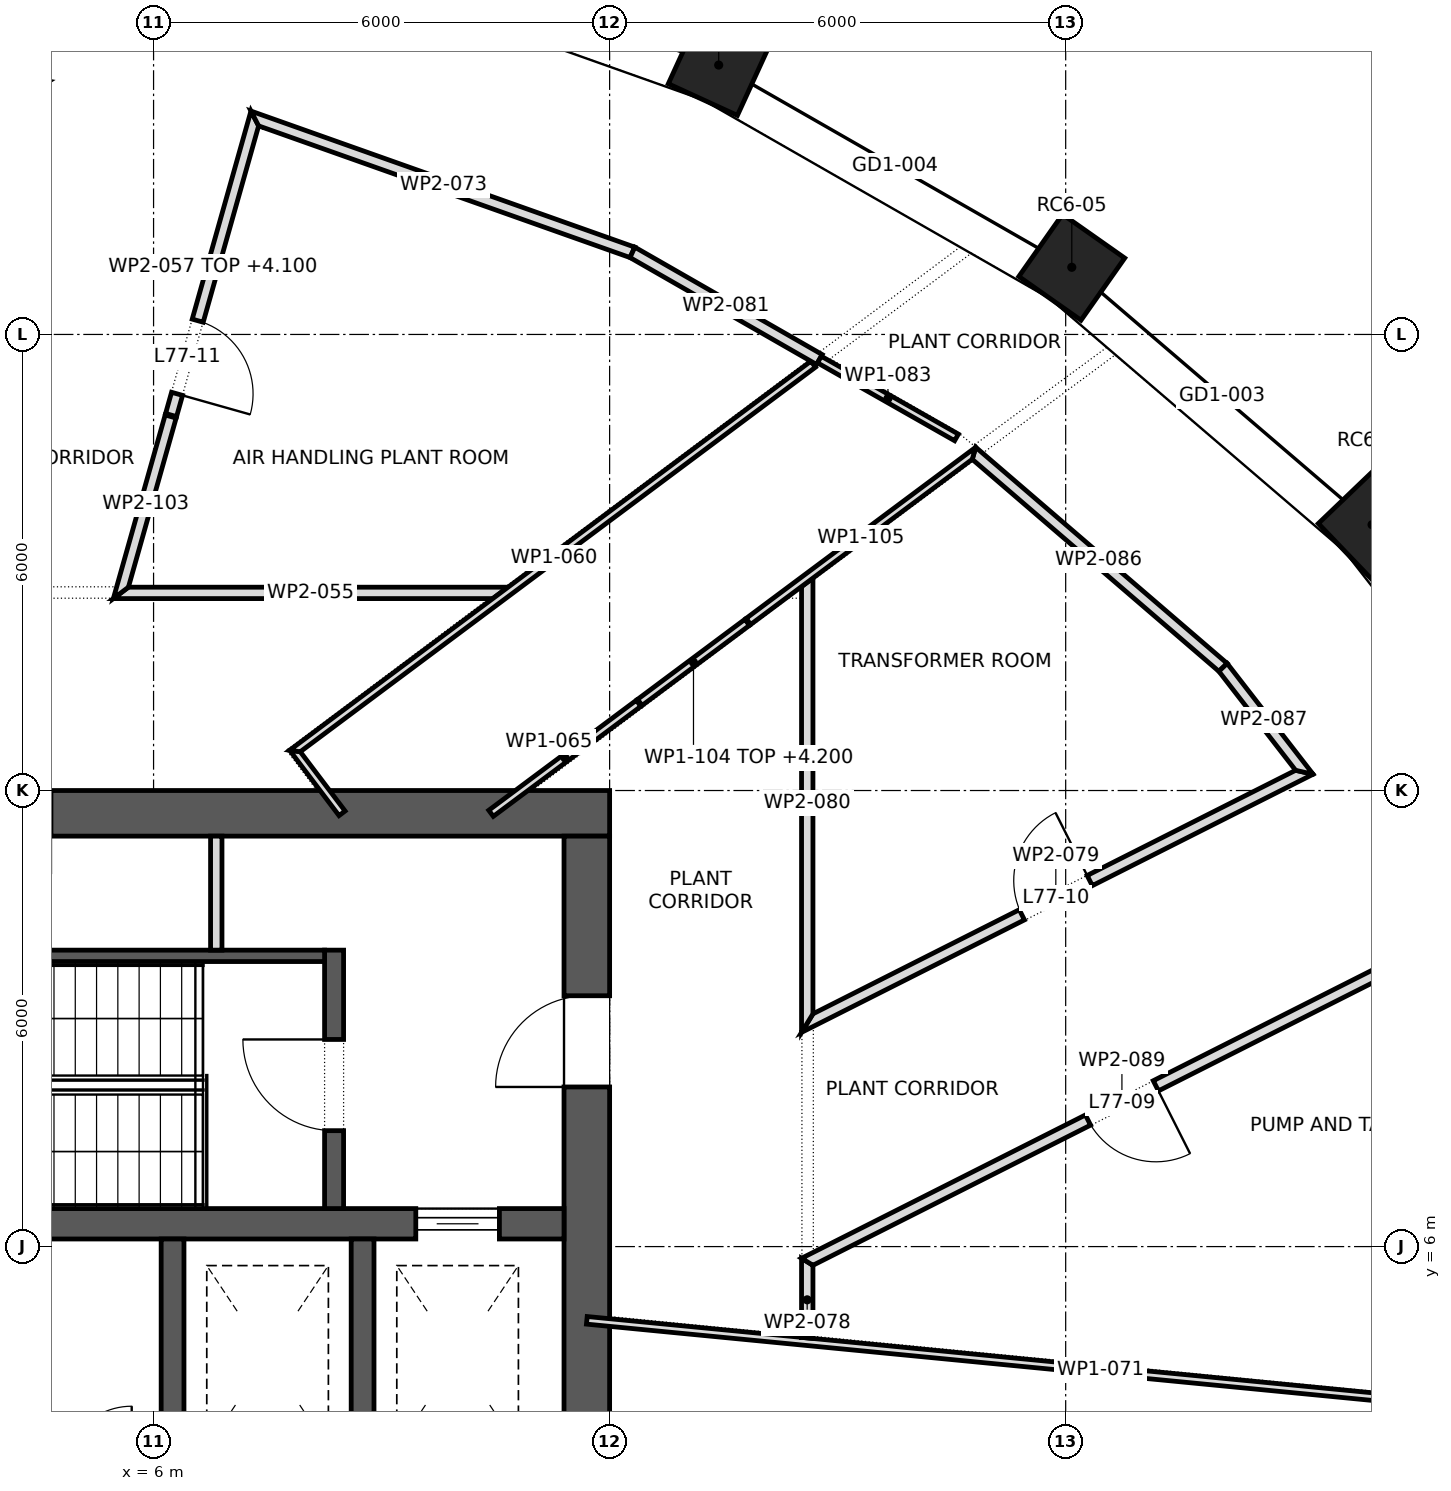
"""IFC4 building model, lengths in metres.
Left out: names, types, materials, properties, quantities, classifications, styles, units other than length and angle.
Written with IfcOpenShell. Run it as: python <this file> out.ifc"""

import sys

from ifc_helpers import new_model, si_unit, direction, frame, frame_2d, origin, origin_2d, place, context, subcontext, project, spatial, polyline, rectangle, outline, extrude, element, fill, save


model = new_model("IFC4")
c1 = context("Model", 3, precision=1e-05, world=origin(), true_north=direction((0.0, 1.0)))
c2 = subcontext(c1, "Body", "Model", "MODEL_VIEW")
j1 = project(units=[si_unit("LENGTHUNIT", "METRE"), si_unit("PLANEANGLEUNIT", "RADIAN")], contexts=[c1])
p1 = place(None, origin())
s1 = spatial("IfcSite", under=j1, at=p1, CompositionType="ELEMENT")
p2 = place(p1, origin())
s2 = spatial("IfcBuilding", under=s1, at=p2, CompositionType="ELEMENT")
p3 = place(p2, frame((0.0, 0.0, 328.3)))
s3 = spatial("IfcBuildingStorey", under=s2, at=p3, CompositionType="ELEMENT", Elevation=328.3)
for number, where, z_axis, x_axis in (
    (1, (22.031, 15.497, 0.0), (0.0, 0.0, 1.0), (-0.692, 0.722, 0.0)),
    (2, (18.08, 18.884, 0.0), (0.0, 0.0, 1.0), (-0.818, 0.575, 0.0)),
    (3, (13.435, 21.544, 0.0), (0.0, 0.0, 1.0), (-0.909, 0.417, 0.0)),
):
    element("IfcColumn", number, at=place(p3, frame(where, z_axis=z_axis, x_axis=x_axis)), inside=s3, PredefinedType="COLUMN", context=c2, shape_type="SweptSolid", body=[
        extrude(rectangle(XDim=1.0, YDim=1.0, at=origin_2d()), origin(), (0.0, 0.0, 1.0), 5.0),
    ])
p4 = place(p3, frame((-12.0, 11.7, 0.0), z_axis=(0.0, 0.0, 1.0), x_axis=(1.0, 0.0, 0.0)))
e4 = element("IfcWall", 4, at=p4, inside=s3, PredefinedType="SHEAR", context=c2, shape_type="SweptSolid", body=[
    extrude(rectangle(XDim=24.0, YDim=0.6, at=frame_2d((12.0, 0.0))), origin(), (0.0, 0.0, 1.0), 5.0),
])
p5 = place(p4, frame((9.4, 0.0, 0.0)))
e5 = element("IfcOpeningElement", 5, at=p5, cuts=e4, PredefinedType="OPENING", context=c2, shape_type="SweptSolid", body=[
    extrude(rectangle(XDim=0.8, YDim=2.1, at=frame_2d((0.4, 1.05))), frame((0.0, 0.312, 0.0), z_axis=(0.0, -1.0, 0.0), x_axis=(1.0, 0.0, 0.0)), (0.0, 0.0, 1.0), 0.624),
])
p6 = place(p4, frame((11.05, 0.0, 0.0)))
e6 = element("IfcOpeningElement", 6, at=p6, cuts=e4, PredefinedType="OPENING", context=c2, shape_type="SweptSolid", body=[
    extrude(rectangle(XDim=0.8, YDim=2.1, at=frame_2d((0.4, 1.05))), frame((0.0, 0.312, 0.0), z_axis=(0.0, -1.0, 0.0), x_axis=(1.0, 0.0, 0.0)), (0.0, 0.0, 1.0), 0.624),
])
p7 = place(p4, frame((4.2, 0.0, 0.0)))
e7 = element("IfcOpeningElement", 7, at=p7, cuts=e4, PredefinedType="OPENING", context=c2, shape_type="SweptSolid", body=[
    extrude(rectangle(XDim=0.8, YDim=2.1, at=frame_2d((0.4, 1.05))), frame((0.0, 0.312, 0.0), z_axis=(0.0, -1.0, 0.0), x_axis=(1.0, 0.0, 0.0)), (0.0, 0.0, 1.0), 0.624),
])
p8 = place(p4, frame((15.85, 0.0, 0.0)))
e8 = element("IfcOpeningElement", 8, at=p8, cuts=e4, PredefinedType="OPENING", context=c2, shape_type="SweptSolid", body=[
    extrude(rectangle(XDim=0.8, YDim=2.1, at=frame_2d((0.4, 1.05))), frame((0.0, 0.312, 0.0), z_axis=(0.0, -1.0, 0.0), x_axis=(1.0, 0.0, 0.0)), (0.0, 0.0, 1.0), 0.624),
])
p9 = place(p3, frame((11.7, -11.4, 0.0), z_axis=(0.0, 0.0, 1.0), x_axis=(0.0, 1.0, 0.0)))
e9 = element("IfcWall", 9, at=p9, inside=s3, PredefinedType="SHEAR", context=c2, shape_type="SweptSolid", body=[
    extrude(rectangle(XDim=22.8, YDim=0.6, at=frame_2d((11.4, 0.0))), origin(), (0.0, 0.0, 1.0), 5.0),
])
p10 = place(p9, frame((10.2, 0.0, 0.0)))
e10 = element("IfcOpeningElement", 10, at=p10, cuts=e9, PredefinedType="OPENING", context=c2, shape_type="SweptSolid", body=[
    extrude(rectangle(XDim=2.4, YDim=2.1, at=frame_2d((1.2, 1.05))), frame((0.0, 0.312, 0.0), z_axis=(0.0, -1.0, 0.0), x_axis=(1.0, 0.0, 0.0)), (0.0, 0.0, 1.0), 0.624),
])
p11 = place(p9, frame((19.5, 0.0, 0.0)))
e11 = element("IfcOpeningElement", 11, at=p11, cuts=e9, PredefinedType="OPENING", context=c2, shape_type="SweptSolid", body=[
    extrude(rectangle(XDim=1.2, YDim=2.1, at=frame_2d((0.6, 1.05))), frame((0.0, 0.312, 0.0), z_axis=(0.0, -1.0, 0.0), x_axis=(1.0, 0.0, 0.0)), (0.0, 0.0, 1.0), 0.624),
])
p12 = place(p9, frame((2.1, 0.0, 0.0)))
e12 = element("IfcOpeningElement", 12, at=p12, cuts=e9, PredefinedType="OPENING", context=c2, shape_type="SweptSolid", body=[
    extrude(rectangle(XDim=1.2, YDim=2.1, at=frame_2d((0.6, 1.05))), frame((0.0, 0.312, 0.0), z_axis=(0.0, -1.0, 0.0), x_axis=(1.0, 0.0, 0.0)), (0.0, 0.0, 1.0), 0.624),
])
p13 = place(p3, frame((-11.4, 6.3, 0.0), z_axis=(0.0, 0.0, 1.0), x_axis=(1.0, 0.0, 0.0)))
e13 = element("IfcWall", 13, at=p13, inside=s3, PredefinedType="SHEAR", context=c2, shape_type="SweptSolid", body=[
    extrude(rectangle(XDim=22.8, YDim=0.4, at=frame_2d((11.4, 0.0))), origin(), (0.0, 0.0, 1.0), 5.0),
])
p14 = place(p13, frame((20.85, 0.0, 0.0)))
e14 = element("IfcOpeningElement", 14, at=p14, cuts=e13, PredefinedType="OPENING", context=c2, shape_type="SweptSolid", body=[
    extrude(rectangle(XDim=1.1, YDim=2.1, at=frame_2d((0.55, 1.05))), frame((0.0, 0.212, 0.0), z_axis=(0.0, -1.0, 0.0), x_axis=(1.0, 0.0, 0.0)), (0.0, 0.0, 1.0), 0.424),
])
for number, where, z_axis, x_axis in (
    (15, (6.25, 3.2, 0.0), (0.0, 0.0, 1.0), (0.0, 1.0, 0.0)),
    (16, (8.75, 3.2, 0.0), (0.0, 0.0, 1.0), (0.0, 1.0, 0.0)),
):
    element("IfcWall", number, at=place(p3, frame(where, z_axis=z_axis, x_axis=x_axis)), inside=s3, PredefinedType="SHEAR", context=c2, shape_type="SweptSolid", body=[
        extrude(rectangle(XDim=2.9, YDim=0.3, at=frame_2d((1.45, 0.0))), origin(), (0.0, 0.0, 1.0), 5.0),
    ])
p15 = place(p3, frame((8.375, 6.5, 0.0), z_axis=(0.0, 0.0, 1.0), x_axis=(0.0, 1.0, 0.0)))
e17 = element("IfcWall", 17, at=p15, inside=s3, PredefinedType="SHEAR", context=c2, shape_type="SweptSolid", body=[
    extrude(rectangle(XDim=3.4, YDim=0.25, at=frame_2d((1.7, 0.0))), origin(), (0.0, 0.0, 1.0), 4.65),
])
p16 = place(p15, frame((1.025, 0.0, 0.0)))
e18 = element("IfcOpeningElement", 18, at=p16, cuts=e17, PredefinedType="OPENING", context=c2, shape_type="SweptSolid", body=[
    extrude(rectangle(XDim=1.2, YDim=2.1, at=frame_2d((0.6, 1.05))), frame((0.0, 0.137, 0.0), z_axis=(0.0, -1.0, 0.0), x_axis=(1.0, 0.0, 0.0)), (0.0, 0.0, 1.0), 0.274),
])
p17 = place(p3, frame((0.25, 9.825, 0.0), z_axis=(0.0, 0.0, 1.0), x_axis=(1.0, 0.0, 0.0)))
e19 = element("IfcWall", 19, at=p17, inside=s3, PredefinedType="SHEAR", context=c2, shape_type="SweptSolid", body=[
    extrude(rectangle(XDim=8.0, YDim=0.15, at=frame_2d((4.0, 0.0))), origin(), (0.0, 0.0, 1.0), 4.65),
])
p18 = place(p3, frame((6.825, 9.9, 0.0), z_axis=(0.0, 0.0, 1.0), x_axis=(0.0, 1.0, 0.0)))
e20 = element("IfcWall", 20, at=p18, inside=s3, PredefinedType="PARTITIONING", context=c2, shape_type="SweptSolid", body=[
    extrude(rectangle(XDim=1.5, YDim=0.15, at=frame_2d((0.75, 0.0))), origin(), (0.0, 0.0, 1.0), 4.65),
])
p19 = place(p3, frame((5.471, 14.6, 0.0), z_axis=(0.0, 0.0, 1.0), x_axis=(1.0, 0.0, 0.0)))
e21 = element("IfcWall", 21, at=p19, inside=s3, PredefinedType="PARTITIONING", context=c2, shape_type="SweptSolid", body=[
    extrude(outline(polyline([(0.0, -0.075), (1.664, -0.075), (3.328, -0.075), (4.992, -0.075), (5.193, 0.075), (5.193, 0.075), (3.528, 0.075), (1.863, 0.075), (0.198, 0.075), (0.198, 0.075), (0.198, 0.075), (0.099, 0.0), (0.0, -0.075)])), origin(), (0.0, 0.0, 1.0), 4.65),
])
p20 = place(p3, frame((7.354, 20.919, 0.0), z_axis=(0.0, 0.0, 1.0), x_axis=(-0.271630861441, -0.9624015145, 0.0)))
e22 = element("IfcWall", 22, at=p20, inside=s3, PredefinedType="PARTITIONING", context=c2, shape_type="SweptSolid", body=[
    extrude(outline(polyline([(4.144, 0.075), (2.152, 0.075), (0.16, 0.075), (0.0, -0.075), (1.382, -0.075), (2.763, -0.075), (4.144, -0.075), (4.144, 0.075)])), origin(), (0.0, 0.0, 1.0), 4.1),
])
p21 = place(p20, frame((2.844, 0.0, 0.0)))
e23 = element("IfcOpeningElement", 23, at=p21, cuts=e22, PredefinedType="OPENING", context=c2, shape_type="SweptSolid", body=[
    extrude(rectangle(XDim=1.0, YDim=2.1, at=frame_2d((0.5, 1.05))), frame((0.0, 0.087, 0.0), z_axis=(0.0, -1.0, 0.0), x_axis=(1.0, 0.0, 0.0)), (0.0, 0.0, 1.0), 0.174),
])
p22 = place(p3, frame((7.83, 12.56, 0.0), z_axis=(0.0, 0.0, 1.0), x_axis=(0.603146922662, -0.79763010831, 0.0)))
e24 = element("IfcWall", 24, at=p22, inside=s3, PredefinedType="PARTITIONING", context=c2, shape_type="SweptSolid", body=[
    extrude(outline(polyline([(1.078, 0.05), (0.101, 0.05), (0.0, -0.05), (0.0, -0.05), (1.078, -0.05), (1.078, 0.05)])), origin(), (0.0, 0.0, 1.0), 4.65),
])
p23 = place(p3, frame((7.82, 12.49, 0.0), z_axis=(0.0, 0.0, 1.0), x_axis=(0.801408213351, 0.598117777343, 0.0)))
e25 = element("IfcWall", 25, at=p23, inside=s3, PredefinedType="PARTITIONING", context=c2, shape_type="SweptSolid", body=[
    extrude(outline(polyline([(0.0, 0.05), (0.0, 0.05), (0.101, -0.05), (1.792, -0.05), (3.483, -0.05), (5.175, -0.05), (6.866, -0.05), (8.558, -0.05), (8.558, 0.05), (6.846, 0.05), (5.135, 0.05), (3.423, 0.05), (1.712, 0.05), (0.0, 0.05)])), origin(), (0.0, 0.0, 1.0), 4.65),
])
p24 = place(p3, frame((10.44, 11.7, 0.0), z_axis=(0.0, 0.0, 1.0), x_axis=(0.801719620775, 0.597700300873, 0.0)))
e26 = element("IfcWall", 26, at=p24, inside=s3, PredefinedType="PARTITIONING", context=c2, shape_type="SweptSolid", body=[
    extrude(outline(polyline([(0.0, 0.05), (0.0, -0.05), (2.432, -0.05), (2.432, 0.05), (0.0, 0.05)])), origin(), (0.0, 0.0, 1.0), 4.65),
])
p25 = place(p3, frame((11.7, 5.03, 0.0), z_axis=(0.0, 0.0, 1.0), x_axis=(0.995314737099, -0.096688024663, 0.0)))
e27 = element("IfcWall", 27, at=p25, inside=s3, PredefinedType="PARTITIONING", context=c2, shape_type="SweptSolid", body=[
    extrude(outline(polyline([(13.617, -0.05), (13.617, -0.048), (13.607, -0.016), (13.583, -0.024), (13.558, 0.05), (11.772, 0.05), (9.986, 0.05), (8.2, 0.05), (6.414, 0.05), (4.628, 0.05), (2.843, 0.05), (2.833, 0.049), (2.833, 0.05), (1.417, 0.05), (0.0, 0.05), (0.0, -0.05), (1.945, -0.05), (3.891, -0.05), (5.836, -0.05), (7.781, -0.05), (9.727, -0.05), (11.672, -0.05), (13.617, -0.05)])), origin(), (0.0, 0.0, 1.0), 4.65),
])
p26 = place(p3, frame((12.306, 19.078, 0.0), z_axis=(0.0, 0.0, 1.0), x_axis=(-0.942502297723, 0.334199669042, 0.0)))
e28 = element("IfcWall", 28, at=p26, inside=s3, PredefinedType="PARTITIONING", context=c2, shape_type="SweptSolid", body=[
    extrude(outline(polyline([(0.0, -0.075), (1.786, -0.075), (3.572, -0.075), (5.358, -0.075), (5.198, 0.075), (3.47, 0.075), (1.742, 0.075), (0.014, 0.075), (0.0, -0.075)])), origin(), (0.0, 0.0, 1.0), 4.65),
])
p27 = place(p3, frame((14.6, 5.846, 0.0), z_axis=(0.0, 0.0, 1.0), x_axis=(0.0, -1.0, 0.0)))
e29 = element("IfcWall", 29, at=p27, inside=s3, PredefinedType="PARTITIONING", context=c2, shape_type="SweptSolid", body=[
    extrude(outline(polyline([(0.0, -0.075), (1.04, -0.075), (1.055, 0.072), (1.055, 0.075), (0.092, 0.075), (0.092, 0.075), (0.092, 0.075), (0.046, 0.0), (0.0, -0.075)])), origin(), (0.0, 0.0, 1.0), 4.65),
])
p28 = place(p3, frame((14.491, 8.885, 0.0), z_axis=(0.0, 0.0, 1.0), x_axis=(0.892775886328, 0.450501073018, 0.0)))
e30 = element("IfcWall", 30, at=p28, inside=s3, PredefinedType="PARTITIONING", context=c2, shape_type="SweptSolid", body=[
    extrude(outline(polyline([(0.0, -0.075), (1.885, -0.075), (3.769, -0.075), (5.654, -0.075), (7.538, -0.075), (7.356, 0.075), (5.578, 0.075), (3.8, 0.075), (2.022, 0.075), (0.244, 0.075), (0.0, -0.075), (0.0, -0.075)])), origin(), (0.0, 0.0, 1.0), 4.65),
])
p29 = place(p28, frame((3.285, 0.0, 0.0)))
e31 = element("IfcOpeningElement", 31, at=p29, cuts=e30, PredefinedType="OPENING", context=c2, shape_type="SweptSolid", body=[
    extrude(rectangle(XDim=1.0, YDim=2.1, at=frame_2d((0.5, 1.05))), frame((0.0, 0.087, 0.0), z_axis=(0.0, -1.0, 0.0), x_axis=(1.0, 0.0, 0.0)), (0.0, 0.0, 1.0), 0.174),
])
p30 = place(p3, frame((14.6, 14.794, 0.0), z_axis=(0.0, 0.0, 1.0), x_axis=(0.0, -1.0, 0.0)))
e32 = element("IfcWall", 32, at=p30, inside=s3, PredefinedType="PARTITIONING", context=c2, shape_type="SweptSolid", body=[
    extrude(outline(polyline([(0.111, -0.075), (2.066, -0.075), (4.021, -0.075), (5.976, -0.075), (5.854, 0.0), (5.732, 0.075), (5.732, 0.075), (5.732, 0.075), (3.822, 0.075), (1.911, 0.075), (0.0, 0.075), (0.0, 0.074), (0.111, -0.075)])), origin(), (0.0, 0.0, 1.0), 4.65),
])
p31 = place(p3, frame((14.76, 17.67, 0.0), z_axis=(0.0, 0.0, 1.0), x_axis=(-0.867555136947, 0.497341014151, 0.0)))
e33 = element("IfcWall", 33, at=p31, inside=s3, PredefinedType="PARTITIONING", context=c2, shape_type="SweptSolid", body=[
    extrude(outline(polyline([(0.0, -0.075), (1.421, -0.075), (2.842, -0.075), (2.829, 0.075), (1.414, 0.075), (0.0, 0.075), (0.0, -0.075)])), origin(), (0.0, 0.0, 1.0), 4.65),
])
p32 = place(p3, frame((16.563, 16.645, 0.0), z_axis=(0.0, 0.0, 1.0), x_axis=(-0.86946460017, 0.493995252053, 0.0)))
e34 = element("IfcWall", 34, at=p32, inside=s3, PredefinedType="PARTITIONING", context=c2, shape_type="SweptSolid", body=[
    extrude(rectangle(XDim=2.074, YDim=0.1, at=frame_2d((1.037, 0.0))), origin(), (0.0, 0.0, 1.0), 4.65),
])
p33 = place(p3, frame((20.076, 13.615, 0.0), z_axis=(0.0, 0.0, 1.0), x_axis=(-0.758268185536, 0.651942757306, 0.0)))
e35 = element("IfcWall", 35, at=p33, inside=s3, PredefinedType="PARTITIONING", context=c2, shape_type="SweptSolid", body=[
    extrude(outline(polyline([(0.0, -0.075), (1.454, -0.075), (2.908, -0.075), (4.363, -0.075), (4.294, 0.075), (2.867, 0.075), (1.441, 0.075), (0.015, 0.075), (0.0, -0.075)])), origin(), (0.0, 0.0, 1.0), 4.65),
])
p34 = place(p3, frame((21.196, 12.168, 0.0), z_axis=(0.0, 0.0, 1.0), x_axis=(-0.612776292464, 0.790256423823, 0.0)))
e36 = element("IfcWall", 36, at=p34, inside=s3, PredefinedType="PARTITIONING", context=c2, shape_type="SweptSolid", body=[
    extrude(outline(polyline([(0.0, -0.075), (1.845, -0.075), (1.83, 0.075), (0.182, 0.075), (0.0, -0.075), (0.0, -0.075)])), origin(), (0.0, 0.0, 1.0), 4.65),
])
p35 = place(p3, frame((22.948, 10.014, 0.0), z_axis=(0.0, 0.0, 1.0), x_axis=(-0.892695521655, -0.450660299579, 0.0)))
e37 = element("IfcWall", 37, at=p35, inside=s3, PredefinedType="PARTITIONING", context=c2, shape_type="SweptSolid", body=[
    extrude(outline(polyline([(9.397, -0.075), (9.397, -0.075), (9.305, 0.075), (7.475, 0.075), (5.644, 0.075), (3.814, 0.075), (1.983, 0.075), (0.152, 0.075), (0.0, -0.075), (0.0, -0.075), (1.879, -0.075), (3.759, -0.075), (5.638, -0.075), (7.518, -0.075), (9.397, -0.075)])), origin(), (0.0, 0.0, 1.0), 4.65),
])
p36 = place(p35, frame((4.214, 0.0, 0.0)))
e38 = element("IfcOpeningElement", 38, at=p36, cuts=e37, PredefinedType="OPENING", context=c2, shape_type="SweptSolid", body=[
    extrude(rectangle(XDim=1.0, YDim=2.1, at=frame_2d((0.5, 1.05))), frame((0.0, 0.087, 0.0), z_axis=(0.0, -1.0, 0.0), x_axis=(1.0, 0.0, 0.0)), (0.0, 0.0, 1.0), 0.174),
])
p37 = place(p3, frame((6.228, 16.93, 0.0), z_axis=(0.0, 0.0, 1.0), x_axis=(-0.271623518644, -0.962403586922, 0.0)))
e39 = element("IfcWall", 39, at=p37, inside=s3, PredefinedType="PARTITIONING", context=c2, shape_type="SweptSolid", body=[
    extrude(outline(polyline([(0.0, -0.075), (1.26, -0.075), (2.52, -0.075), (2.322, 0.075), (0.0, 0.075), (0.0, -0.075)])), origin(), (0.0, 0.0, 1.0), 4.65),
])
p38 = place(p3, frame((12.389, 13.153, 0.0), z_axis=(0.0, 0.0, 1.0), x_axis=(0.801690929697, 0.597738783451, 0.0)))
e40 = element("IfcWall", 40, at=p38, inside=s3, PredefinedType="PARTITIONING", context=c2, shape_type="SweptSolid", body=[
    extrude(outline(polyline([(0.0, 0.05), (0.0, -0.05), (1.781, -0.05), (1.781, 0.05), (0.0, 0.05)])), origin(), (0.0, 0.0, 1.0), 4.2),
])
p39 = place(p3, frame((13.817, 14.218, 0.0), z_axis=(0.0, 0.0, 1.0), x_axis=(0.801741359851, 0.597671140264, 0.0)))
e41 = element("IfcWall", 41, at=p39, inside=s3, PredefinedType="PARTITIONING", context=c2, shape_type="SweptSolid", body=[
    extrude(outline(polyline([(0.0, -0.05), (1.823, -0.05), (3.647, -0.05), (3.778, 0.05), (3.778, 0.05), (1.889, 0.05), (0.0, 0.05), (0.0, -0.05)])), origin(), (0.0, 0.0, 1.0), 4.65),
])
p40 = place(p14, origin())
e42 = element("IfcDoor", 42, at=p40, inside=s3, OperationType="SLIDING_TO_LEFT", PredefinedType="DOOR", context=c2, shape_type="SweptSolid", body=[
    extrude(rectangle(XDim=1.1, YDim=2.1, at=frame_2d((0.55, 1.05))), frame((0.0, 0.025, 0.0), z_axis=(0.0, -1.0, 0.0), x_axis=(1.0, 0.0, 0.0)), (0.0, 0.0, 1.0), 0.05),
])
fill(e14, e42)
p41 = place(p16, origin())
e43 = element("IfcDoor", 43, at=p41, inside=s3, OperationType="SINGLE_SWING_LEFT", PredefinedType="DOOR", context=c2, shape_type="SweptSolid", body=[
    extrude(rectangle(XDim=1.2, YDim=2.1, at=frame_2d((0.6, 1.05))), frame((0.0, 0.025, 0.0), z_axis=(0.0, -1.0, 0.0), x_axis=(1.0, 0.0, 0.0)), (0.0, 0.0, 1.0), 0.05),
])
fill(e18, e43)
p42 = place(p11, origin())
e44 = element("IfcDoor", 44, at=p42, inside=s3, OperationType="SINGLE_SWING_RIGHT", PredefinedType="DOOR", context=c2, shape_type="SweptSolid", body=[
    extrude(rectangle(XDim=1.2, YDim=2.1, at=frame_2d((0.6, 1.05))), frame((0.0, 0.025, 0.0), z_axis=(0.0, -1.0, 0.0), x_axis=(1.0, 0.0, 0.0)), (0.0, 0.0, 1.0), 0.05),
])
fill(e11, e44)
p43 = place(p36, origin())
e45 = element("IfcDoor", 45, at=p43, inside=s3, OperationType="SINGLE_SWING_RIGHT", PredefinedType="DOOR", context=c2, shape_type="SweptSolid", body=[
    extrude(rectangle(XDim=1.0, YDim=2.1, at=frame_2d((0.5, 1.05))), frame((0.0, 0.025, 0.0), z_axis=(0.0, -1.0, 0.0), x_axis=(1.0, 0.0, 0.0)), (0.0, 0.0, 1.0), 0.05),
])
fill(e38, e45)
p44 = place(p29, origin())
e46 = element("IfcDoor", 46, at=p44, inside=s3, OperationType="SINGLE_SWING_LEFT", PredefinedType="DOOR", context=c2, shape_type="SweptSolid", body=[
    extrude(rectangle(XDim=1.0, YDim=2.1, at=frame_2d((0.5, 1.05))), frame((0.0, 0.025, 0.0), z_axis=(0.0, -1.0, 0.0), x_axis=(1.0, 0.0, 0.0)), (0.0, 0.0, 1.0), 0.05),
])
fill(e31, e46)
p45 = place(p21, origin())
e47 = element("IfcDoor", 47, at=p45, inside=s3, OperationType="SINGLE_SWING_LEFT", PredefinedType="DOOR", context=c2, shape_type="SweptSolid", body=[
    extrude(rectangle(XDim=1.0, YDim=2.1, at=frame_2d((0.5, 1.05))), frame((0.0, 0.025, 0.0), z_axis=(0.0, -1.0, 0.0), x_axis=(1.0, 0.0, 0.0)), (0.0, 0.0, 1.0), 0.05),
])
fill(e23, e47)
save(model, sys.argv[1])
